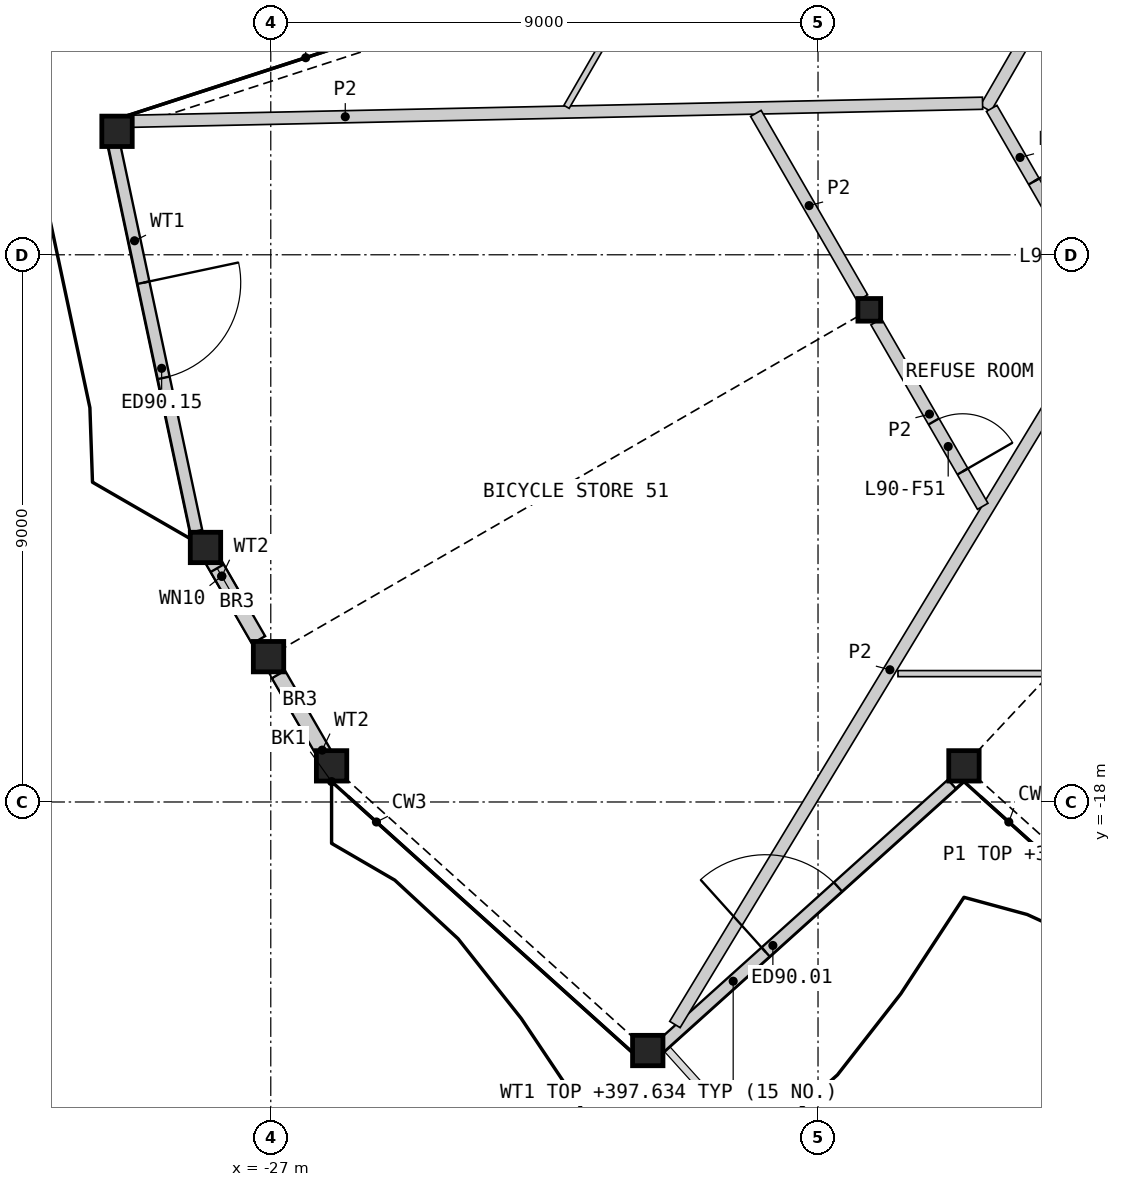
"""IFC4 building model, lengths in metres.
Left out: names, types, materials, properties, quantities, classifications, styles, units other than length and angle.
Written with IfcOpenShell. Run it as: python <this file> out.ifc"""

import sys

from ifc_helpers import new_model, si_unit, direction, frame, frame_2d, origin, origin_2d, place, context, subcontext, project, spatial, rectangle, hollow_rectangle, i_section, extrude, element, fill, save


model = new_model("IFC4")
c1 = context("Model", 3, precision=1e-05, world=origin(), true_north=direction((0.0, 1.0)))
c2 = subcontext(c1, "Body", "Model", "MODEL_VIEW")
j1 = project(units=[si_unit("LENGTHUNIT", "METRE"), si_unit("PLANEANGLEUNIT", "RADIAN")], contexts=[c1])
p1 = place(None, origin())
s1 = spatial("IfcSite", under=j1, at=p1, CompositionType="ELEMENT")
p2 = place(p1, origin())
s2 = spatial("IfcBuilding", under=s1, at=p2, CompositionType="ELEMENT")
p3 = place(p2, frame((0.0, 0.0, 395.0)))
s3 = spatial("IfcBuildingStorey", under=s2, at=p3, CompositionType="ELEMENT", Elevation=395.0)
for number, where, z_axis, x_axis in (
    (1, (-26.0, -17.406, 0.0), (0.0, 0.0, 1.0), (1.0, 0.0, 0.0)),
    (2, (-20.8, -22.088, 0.0), (0.0, 0.0, 1.0), (1.0, 0.0, 0.0)),
    (3, (-15.6, -17.406, 0.0), (0.0, 0.0, 1.0), (1.0, 0.0, 0.0)),
    (4, (-29.529, -6.969, 0.0), (0.0, 0.0, 1.0), (1.0, 0.0, 0.0)),
    (5, (-28.074, -13.814, 0.0), (0.0, 0.0, 1.0), (1.0, 0.0, 0.0)),
    (6, (-27.037, -15.61, 0.0), (0.0, 0.0, 1.0), (1.0, 0.0, 0.0)),
):
    element("IfcColumn", number, at=place(p3, frame(where, z_axis=z_axis, x_axis=x_axis)), inside=s3, PredefinedType="COLUMN", context=c2, shape_type="SweptSolid", body=[
        extrude(hollow_rectangle(XDim=0.5, YDim=0.5, WallThickness=0.03, at=origin_2d()), origin(), (0.0, 0.0, 1.0), 3.4),
    ])
p4 = place(p3, frame((-17.157, -9.906, 0.0), z_axis=(0.0, 0.0, 1.0), x_axis=(1.0, 0.0, 0.0)))
e7 = element("IfcColumn", 7, at=p4, inside=s3, PredefinedType="COLUMN", context=c2, shape_type="SweptSolid", body=[
    extrude(i_section(OverallWidth=0.374, OverallDepth=0.372, WebThickness=0.016, FlangeThickness=0.026, at=origin_2d()), origin(), (0.0, 0.0, 1.0), 3.4),
])
p5 = place(p3, frame((-20.595, -22.028, 0.0), z_axis=(0.0, 0.0, 1.0), x_axis=(0.743153126052, 0.669121387522, 0.0)))
e8 = element("IfcWall", 8, at=p5, inside=s3, PredefinedType="SOLIDWALL", context=c2, shape_type="SweptSolid", body=[
    extrude(rectangle(XDim=6.457, YDim=0.2, at=frame_2d((3.229, 0.0))), origin(), (0.0, 0.0, 1.0), 2.634),
])
p6 = place(p5, frame((2.333, 0.0, 0.0)))
e9 = element("IfcOpeningElement", 9, at=p6, cuts=e8, PredefinedType="OPENING", context=c2, shape_type="SweptSolid", body=[
    extrude(rectangle(XDim=1.6, YDim=2.25, at=frame_2d((0.8, 1.125))), frame((0.0, 0.11, 0.0), z_axis=(0.0, -1.0, 0.0), x_axis=(1.0, 0.0, 0.0)), (0.0, 0.0, 1.0), 0.22),
])
p7 = place(p3, frame((-29.579, -7.177, 0.0), z_axis=(0.0, 0.0, 1.0), x_axis=(0.207910765171, -0.978147797486, 0.0)))
e10 = element("IfcWall", 10, at=p7, inside=s3, PredefinedType="SOLIDWALL", context=c2, shape_type="SweptSolid", body=[
    extrude(rectangle(XDim=6.512, YDim=0.2, at=frame_2d((3.256, 0.0))), origin(), (0.0, 0.0, 1.0), 2.634),
])
p8 = place(p7, frame((2.333, 0.0, 0.0)))
e11 = element("IfcOpeningElement", 11, at=p8, cuts=e10, PredefinedType="OPENING", context=c2, shape_type="SweptSolid", body=[
    extrude(rectangle(XDim=1.6, YDim=2.25, at=frame_2d((0.8, 1.125))), frame((0.0, 0.11, 0.0), z_axis=(0.0, -1.0, 0.0), x_axis=(1.0, 0.0, 0.0)), (0.0, 0.0, 1.0), 0.22),
])
p9 = place(p3, frame((-28.007, -13.939, 0.0), z_axis=(0.0, 0.0, 1.0), x_axis=(0.499967189098, -0.866044346339, 0.0)))
e12 = element("IfcWall", 12, at=p9, inside=s3, PredefinedType="SOLIDWALL", context=c2, shape_type="SweptSolid", body=[
    extrude(rectangle(XDim=1.612, YDim=0.25, at=frame_2d((0.806, 0.0))), origin(), (0.0, 0.0, 1.0), 2.634),
])
p10 = place(p9, frame((0.25, 0.0, 0.4)))
e13 = element("IfcOpeningElement", 13, at=p10, cuts=e12, PredefinedType="OPENING", context=c2, shape_type="SweptSolid", body=[
    extrude(rectangle(XDim=0.6, YDim=0.6, at=frame_2d((0.3, 0.3))), frame((0.0, 0.135, 0.0), z_axis=(0.0, -1.0, 0.0), x_axis=(1.0, 0.0, 0.0)), (0.0, 0.0, 1.0), 0.27),
])
p11 = place(p3, frame((-26.874, -15.902, 0.0), z_axis=(0.0, 0.0, 1.0), x_axis=(0.500017882314, -0.866015079179, 0.0)))
e14 = element("IfcWall", 14, at=p11, inside=s3, PredefinedType="SOLIDWALL", context=c2, shape_type="SweptSolid", body=[
    extrude(rectangle(XDim=1.598, YDim=0.25, at=frame_2d((0.799, 0.0))), origin(), (0.0, 0.0, 1.0), 2.634),
])
p12 = place(p3, frame((-15.244, -6.592, 0.0), z_axis=(0.0, 0.0, 1.0), x_axis=(0.499974648164, 0.866040040179, 0.0)))
e15 = element("IfcWall", 15, at=p12, inside=s3, PredefinedType="PARTITIONING", context=c2, shape_type="SweptSolid", body=[
    extrude(rectangle(XDim=4.525, YDim=0.2, at=frame_2d((2.263, 0.0))), origin(), (0.0, 0.0, 1.0), 3.1),
])
p13 = place(p3, frame((-15.144, -6.592, 0.0), z_axis=(0.0, 0.0, 1.0), x_axis=(0.499958791762, -0.866049194065, 0.0)))
e16 = element("IfcWall", 16, at=p13, inside=s3, PredefinedType="PARTITIONING", context=c2, shape_type="SweptSolid", body=[
    extrude(rectangle(XDim=3.726, YDim=0.2, at=frame_2d((1.863, 0.0))), origin(), (0.0, 0.0, 1.0), 3.1),
])
p14 = place(p13, frame((1.388, 0.0, 0.0)))
e17 = element("IfcOpeningElement", 17, at=p14, cuts=e16, PredefinedType="OPENING", context=c2, shape_type="SweptSolid", body=[
    extrude(rectangle(XDim=0.95, YDim=2.1, at=frame_2d((0.475, 1.05))), frame((0.0, 0.11, 0.0), z_axis=(0.0, -1.0, 0.0), x_axis=(1.0, 0.0, 0.0)), (0.0, 0.0, 1.0), 0.22),
])
p15 = place(p3, frame((-20.354, -21.66, 0.0), z_axis=(0.0, 0.0, 1.0), x_axis=(0.518240642668, 0.85523484277, 0.0)))
e18 = element("IfcWall", 18, at=p15, inside=s3, PredefinedType="PARTITIONING", context=c2, shape_type="SweptSolid", body=[
    extrude(rectangle(XDim=13.644, YDim=0.2, at=frame_2d((6.822, 0.0))), origin(), (0.0, 0.0, 1.0), 2.33),
])
p16 = place(p3, frame((-29.269, -6.804, 0.0), z_axis=(0.0, 0.0, 1.0), x_axis=(0.999775536303, 0.021186717777, 0.0)))
e19 = element("IfcWall", 19, at=p16, inside=s3, PredefinedType="PARTITIONING", context=c2, shape_type="SweptSolid", body=[
    extrude(rectangle(XDim=13.978, YDim=0.2, at=frame_2d((6.989, 0.0))), origin(), (0.0, 0.0, 1.0), 2.33),
])
p17 = place(p3, frame((-17.043, -10.103, 0.0), z_axis=(0.0, 0.0, 1.0), x_axis=(0.500005931509, -0.866021979199, 0.0)))
e20 = element("IfcWall", 20, at=p17, inside=s3, PredefinedType="PARTITIONING", context=c2, shape_type="SweptSolid", body=[
    extrude(rectangle(XDim=3.504, YDim=0.2, at=frame_2d((1.752, 0.0))), origin(), (0.0, 0.0, 1.0), 2.33),
])
p18 = place(p17, frame((1.893, 0.0, 0.0)))
e21 = element("IfcOpeningElement", 21, at=p18, cuts=e20, PredefinedType="OPENING", context=c2, shape_type="SweptSolid", body=[
    extrude(rectangle(XDim=0.95, YDim=2.1, at=frame_2d((0.475, 1.05))), frame((0.0, 0.11, 0.0), z_axis=(0.0, -1.0, 0.0), x_axis=(1.0, 0.0, 0.0)), (0.0, 0.0, 1.0), 0.22),
])
p19 = place(p3, frame((-19.022, -6.674, 0.0), z_axis=(0.0, 0.0, 1.0), x_axis=(0.499983843005, -0.866034731829, 0.0)))
e22 = element("IfcWall", 22, at=p19, inside=s3, PredefinedType="PARTITIONING", context=c2, shape_type="SweptSolid", body=[
    extrude(rectangle(XDim=3.503, YDim=0.2, at=frame_2d((1.752, 0.0))), origin(), (0.0, 0.0, 1.0), 2.33),
])
p20 = place(p3, frame((-22.136, -6.567, 0.0), z_axis=(0.0, 0.0, 1.0), x_axis=(0.500016298831, 0.866015993445, 0.0)))
e23 = element("IfcWall", 23, at=p20, inside=s3, PredefinedType="PARTITIONING", context=c2, shape_type="SweptSolid", body=[
    extrude(rectangle(XDim=6.305, YDim=0.1, at=frame_2d((3.152, 0.0))), origin(), (0.0, 0.0, 1.0), 2.33),
])
p21 = place(p20, frame((2.88, 0.0, 0.0)))
e24 = element("IfcOpeningElement", 24, at=p21, cuts=e23, PredefinedType="OPENING", context=c2, shape_type="SweptSolid", body=[
    extrude(rectangle(XDim=0.95, YDim=2.1, at=frame_2d((0.475, 1.05))), frame((0.0, 0.06, 0.0), z_axis=(0.0, -1.0, 0.0), x_axis=(1.0, 0.0, 0.0)), (0.0, 0.0, 1.0), 0.12),
])
p22 = place(p3, frame((-16.685, -15.889, 0.0), z_axis=(0.0, 0.0, 1.0), x_axis=(1.0, 0.0, 0.0)))
e25 = element("IfcWall", 25, at=p22, inside=s3, PredefinedType="PARTITIONING", context=c2, shape_type="SweptSolid", body=[
    extrude(rectangle(XDim=6.235, YDim=0.1, at=frame_2d((3.118, 0.0))), origin(), (0.0, 0.0, 1.0), 2.33),
])
p23 = place(p22, frame((4.526, 0.0, 0.0)))
e26 = element("IfcOpeningElement", 26, at=p23, cuts=e25, PredefinedType="OPENING", context=c2, shape_type="SweptSolid", body=[
    extrude(rectangle(XDim=0.95, YDim=2.1, at=frame_2d((0.475, 1.05))), frame((0.0, 0.06, 0.0), z_axis=(0.0, -1.0, 0.0), x_axis=(1.0, 0.0, 0.0)), (0.0, 0.0, 1.0), 0.12),
])
p24 = place(p6, origin())
e27 = element("IfcDoor", 27, at=p24, inside=s3, OperationType="DOUBLE_DOOR_SINGLE_SWING", PredefinedType="DOOR", context=c2, shape_type="SweptSolid", body=[
    extrude(rectangle(XDim=1.6, YDim=2.25, at=frame_2d((0.8, 1.125))), frame((0.0, 0.025, 0.0), z_axis=(0.0, -1.0, 0.0), x_axis=(1.0, 0.0, 0.0)), (0.0, 0.0, 1.0), 0.05),
])
fill(e9, e27)
p25 = place(p8, origin())
e28 = element("IfcDoor", 28, at=p25, inside=s3, OperationType="DOUBLE_DOOR_SINGLE_SWING", PredefinedType="DOOR", context=c2, shape_type="SweptSolid", body=[
    extrude(rectangle(XDim=1.6, YDim=2.25, at=frame_2d((0.8, 1.125))), frame((0.0, 0.025, 0.0), z_axis=(0.0, -1.0, 0.0), x_axis=(1.0, 0.0, 0.0)), (0.0, 0.0, 1.0), 0.05),
])
fill(e11, e28)
p26 = place(p10, origin())
e29 = element("IfcWindow", 29, at=p26, inside=s3, PartitioningType="SINGLE_PANEL", PredefinedType="WINDOW", context=c2, shape_type="SweptSolid", body=[
    extrude(rectangle(XDim=0.6, YDim=0.6, at=frame_2d((0.3, 0.3))), frame((0.0, 0.03, 0.0), z_axis=(0.0, -1.0, 0.0), x_axis=(1.0, 0.0, 0.0)), (0.0, 0.0, 1.0), 0.06),
])
fill(e13, e29)
p27 = place(p14, origin())
e30 = element("IfcDoor", 30, at=p27, inside=s3, OperationType="SINGLE_SWING_LEFT", PredefinedType="DOOR", context=c2, shape_type="SweptSolid", body=[
    extrude(rectangle(XDim=0.95, YDim=2.1, at=frame_2d((0.475, 1.05))), frame((0.0, 0.025, 0.0), z_axis=(0.0, -1.0, 0.0), x_axis=(1.0, 0.0, 0.0)), (0.0, 0.0, 1.0), 0.05),
])
fill(e17, e30)
p28 = place(p18, origin())
e31 = element("IfcDoor", 31, at=p28, inside=s3, OperationType="SINGLE_SWING_RIGHT", PredefinedType="DOOR", context=c2, shape_type="SweptSolid", body=[
    extrude(rectangle(XDim=0.95, YDim=2.1, at=frame_2d((0.475, 1.05))), frame((0.0, 0.025, 0.0), z_axis=(0.0, -1.0, 0.0), x_axis=(1.0, 0.0, 0.0)), (0.0, 0.0, 1.0), 0.05),
])
fill(e21, e31)
save(model, sys.argv[1])
